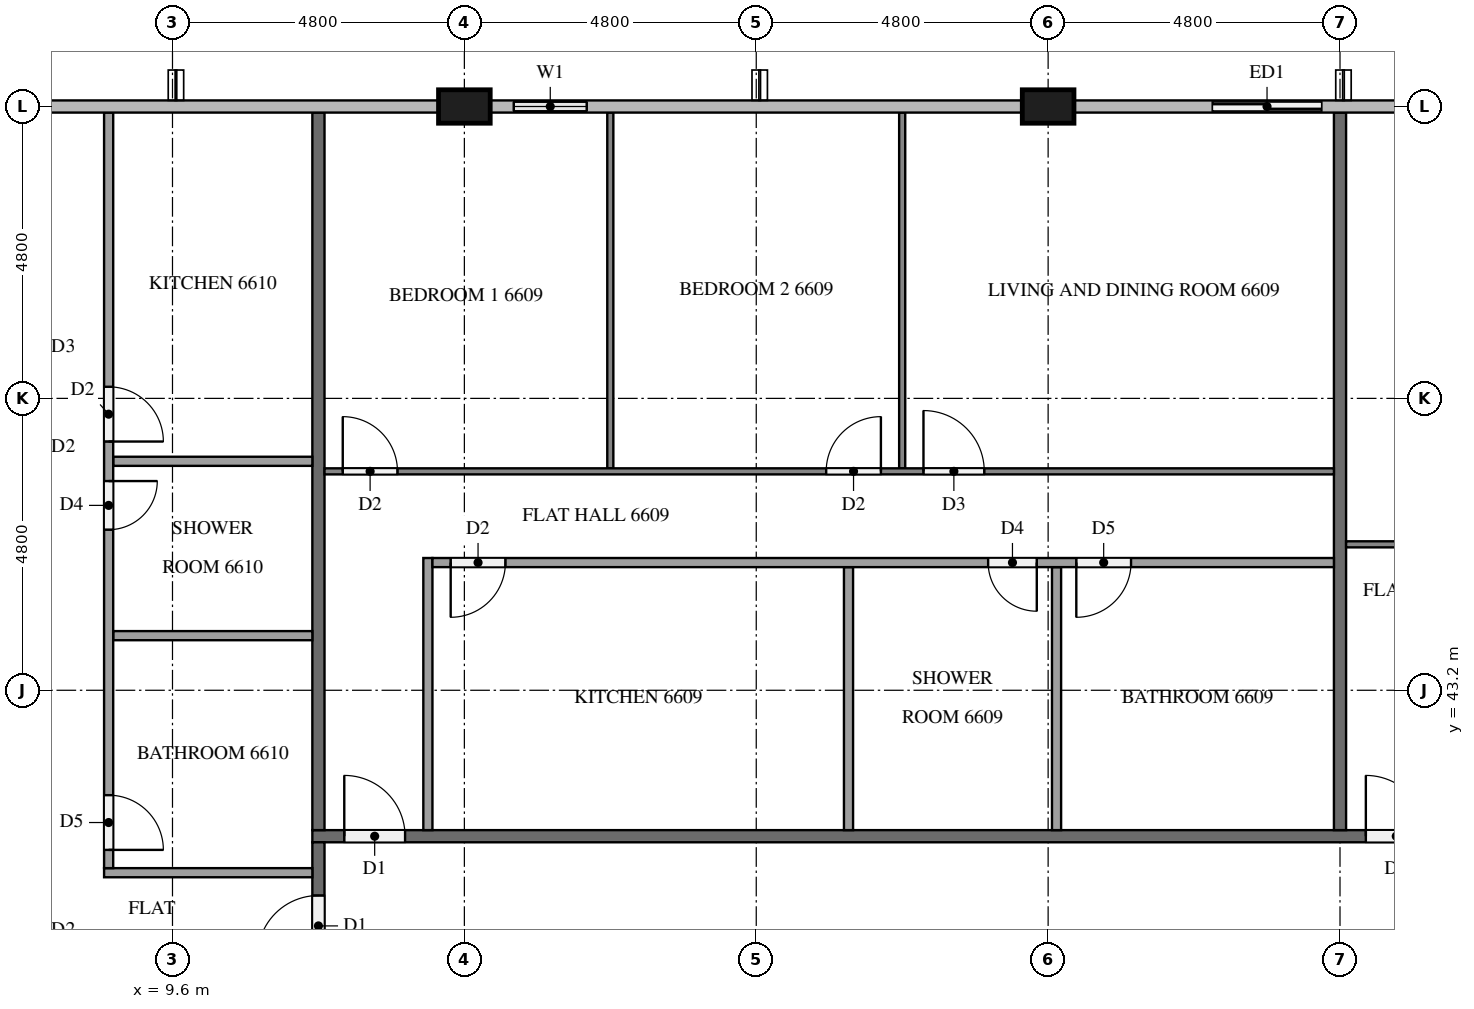
"""IFC4 building model, lengths in metres.
Left out: names, types, materials, properties, quantities, classifications, styles, units other than length and angle.
Written with IfcOpenShell. Run it as: python <this file> out.ifc"""

import sys

from ifc_helpers import new_model, si_unit, direction, frame, frame_2d, origin, origin_2d, place, context, subcontext, project, spatial, rectangle, extrude, element, fill, save


model = new_model("IFC4")
c1 = context("Model", 3, precision=1e-05, world=origin(), true_north=direction((0.0, 1.0)))
c2 = subcontext(c1, "Body", "Model", "MODEL_VIEW")
j1 = project(units=[si_unit("LENGTHUNIT", "METRE"), si_unit("PLANEANGLEUNIT", "RADIAN")], contexts=[c1])
p1 = place(None, origin())
s1 = spatial("IfcSite", under=j1, at=p1, CompositionType="ELEMENT")
p2 = place(p1, origin())
s2 = spatial("IfcBuilding", under=s1, at=p2, CompositionType="ELEMENT")
p3 = place(p2, frame((0.0, 0.0, 252.7)))
s3 = spatial("IfcBuildingStorey", under=s2, at=p3, CompositionType="ELEMENT", Elevation=252.7)
for number, where, z_axis, x_axis in (
    (1, (24.0, 52.8, 0.0), (0.0, 0.0, 1.0), (1.0, 0.0, 0.0)),
    (2, (14.4, 52.8, 0.0), (0.0, 0.0, 1.0), (1.0, 0.0, 0.0)),
):
    element("IfcColumn", number, at=place(p3, frame(where, z_axis=z_axis, x_axis=x_axis)), inside=s3, PredefinedType="COLUMN", context=c2, shape_type="SweptSolid", body=[
        extrude(rectangle(XDim=0.85, YDim=0.55, at=origin_2d()), origin(), (0.0, 0.0, 1.0), 3.2),
    ])
p4 = place(p3, frame((28.8, 52.8, 0.0), z_axis=(0.0, 0.0, 1.0), x_axis=(-1.0, 0.0, 0.0)))
e3 = element("IfcWall", 3, at=p4, inside=s3, PredefinedType="SOLIDWALL", context=c2, shape_type="SweptSolid", body=[
    extrude(rectangle(XDim=2.4, YDim=0.15, at=frame_2d((1.2, 0.0))), origin(), (0.0, 0.0, 1.0), 3.2),
])
p5 = place(p4, frame((0.3, 0.0, 0.0)))
e4 = element("IfcOpeningElement", 4, at=p5, cuts=e3, PredefinedType="OPENING", context=c2, shape_type="SweptSolid", body=[
    extrude(rectangle(XDim=1.8, YDim=2.4, at=frame_2d((0.9, 1.2))), frame((0.0, 0.085, 0.0), z_axis=(0.0, -1.0, 0.0), x_axis=(1.0, 0.0, 0.0)), (0.0, 0.0, 1.0), 0.17),
])
p6 = place(p3, frame((16.8, 52.8, 0.0), z_axis=(0.0, 0.0, 1.0), x_axis=(-1.0, 0.0, 0.0)))
e5 = element("IfcWall", 5, at=p6, inside=s3, PredefinedType="SOLIDWALL", context=c2, shape_type="SweptSolid", body=[
    extrude(rectangle(XDim=1.975, YDim=0.15, at=frame_2d((0.988, 0.0))), origin(), (0.0, 0.0, 1.0), 3.2),
])
p7 = place(p6, frame((0.387, 0.0, 0.9)))
e6 = element("IfcOpeningElement", 6, at=p7, cuts=e5, PredefinedType="OPENING", context=c2, shape_type="SweptSolid", body=[
    extrude(rectangle(XDim=1.2, YDim=1.4, at=frame_2d((0.6, 0.7))), frame((0.0, 0.085, 0.0), z_axis=(0.0, -1.0, 0.0), x_axis=(1.0, 0.0, 0.0)), (0.0, 0.0, 1.0), 0.17),
])
p8 = place(p3, frame((11.9, 40.8, 0.0), z_axis=(0.0, 0.0, 1.0), x_axis=(1.0, 0.0, 0.0)))
e7 = element("IfcWall", 7, at=p8, inside=s3, PredefinedType="PARTITIONING", context=c2, shape_type="SweptSolid", body=[
    extrude(rectangle(XDim=38.6, YDim=0.2, at=frame_2d((19.3, 0.0))), origin(), (0.0, 0.0, 1.0), 3.2),
])
p9 = place(p8, frame((31.725, 0.0, 0.0)))
e8 = element("IfcOpeningElement", 8, at=p9, cuts=e7, PredefinedType="OPENING", context=c2, shape_type="SweptSolid", body=[
    extrude(rectangle(XDim=1.0, YDim=2.1, at=frame_2d((0.5, 1.05))), frame((0.0, 0.11, 0.0), z_axis=(0.0, -1.0, 0.0), x_axis=(1.0, 0.0, 0.0)), (0.0, 0.0, 1.0), 0.22),
])
p10 = place(p8, frame((17.325, 0.0, 0.0)))
e9 = element("IfcOpeningElement", 9, at=p10, cuts=e7, PredefinedType="OPENING", context=c2, shape_type="SweptSolid", body=[
    extrude(rectangle(XDim=1.0, YDim=2.1, at=frame_2d((0.5, 1.05))), frame((0.0, 0.11, 0.0), z_axis=(0.0, -1.0, 0.0), x_axis=(1.0, 0.0, 0.0)), (0.0, 0.0, 1.0), 0.22),
])
p11 = place(p8, frame((0.525, 0.0, 0.0)))
e10 = element("IfcOpeningElement", 10, at=p11, cuts=e7, PredefinedType="OPENING", context=c2, shape_type="SweptSolid", body=[
    extrude(rectangle(XDim=1.0, YDim=2.1, at=frame_2d((0.5, 1.05))), frame((0.0, 0.11, 0.0), z_axis=(0.0, -1.0, 0.0), x_axis=(1.0, 0.0, 0.0)), (0.0, 0.0, 1.0), 0.22),
])
p12 = place(p3, frame((12.0, 12.1, 0.0), z_axis=(0.0, 0.0, 1.0), x_axis=(0.0, 1.0, 0.0)))
e11 = element("IfcWall", 11, at=p12, inside=s3, PredefinedType="PARTITIONING", context=c2, shape_type="SweptSolid", body=[
    extrude(rectangle(XDim=28.6, YDim=0.2, at=frame_2d((14.3, 0.0))), origin(), (0.0, 0.0, 1.0), 3.2),
])
p13 = place(p12, frame((26.725, 0.0, 0.0)))
e12 = element("IfcOpeningElement", 12, at=p13, cuts=e11, PredefinedType="OPENING", context=c2, shape_type="SweptSolid", body=[
    extrude(rectangle(XDim=1.0, YDim=2.1, at=frame_2d((0.5, 1.05))), frame((0.0, 0.11, 0.0), z_axis=(0.0, -1.0, 0.0), x_axis=(1.0, 0.0, 0.0)), (0.0, 0.0, 1.0), 0.22),
])
p14 = place(p12, frame((24.875, 0.0, 0.0)))
e13 = element("IfcOpeningElement", 13, at=p14, cuts=e11, PredefinedType="OPENING", context=c2, shape_type="SweptSolid", body=[
    extrude(rectangle(XDim=1.0, YDim=2.1, at=frame_2d((0.5, 1.05))), frame((0.0, 0.11, 0.0), z_axis=(0.0, -1.0, 0.0), x_axis=(1.0, 0.0, 0.0)), (0.0, 0.0, 1.0), 0.22),
])
p15 = place(p12, frame((17.675, 0.0, 0.0)))
e14 = element("IfcOpeningElement", 14, at=p15, cuts=e11, PredefinedType="OPENING", context=c2, shape_type="SweptSolid", body=[
    extrude(rectangle(XDim=1.0, YDim=2.1, at=frame_2d((0.5, 1.05))), frame((0.0, 0.11, 0.0), z_axis=(0.0, -1.0, 0.0), x_axis=(1.0, 0.0, 0.0)), (0.0, 0.0, 1.0), 0.22),
])
p16 = place(p12, frame((2.725, 0.0, 0.0)))
e15 = element("IfcOpeningElement", 15, at=p16, cuts=e11, PredefinedType="OPENING", context=c2, shape_type="SweptSolid", body=[
    extrude(rectangle(XDim=1.0, YDim=2.1, at=frame_2d((0.5, 1.05))), frame((0.0, 0.11, 0.0), z_axis=(0.0, -1.0, 0.0), x_axis=(1.0, 0.0, 0.0)), (0.0, 0.0, 1.0), 0.22),
])
p17 = place(p12, frame((0.875, 0.0, 0.0)))
e16 = element("IfcOpeningElement", 16, at=p17, cuts=e11, PredefinedType="OPENING", context=c2, shape_type="SweptSolid", body=[
    extrude(rectangle(XDim=1.0, YDim=2.1, at=frame_2d((0.5, 1.05))), frame((0.0, 0.11, 0.0), z_axis=(0.0, -1.0, 0.0), x_axis=(1.0, 0.0, 0.0)), (0.0, 0.0, 1.0), 0.22),
])
for number, where, z_axis, x_axis in (
    (17, (28.8, 52.7, 0.0), (0.0, 0.0, 1.0), (0.0, -1.0, 0.0)),
    (18, (12.0, 52.7, 0.0), (0.0, 0.0, 1.0), (0.0, -1.0, 0.0)),
):
    element("IfcWall", number, at=place(p3, frame(where, z_axis=z_axis, x_axis=x_axis)), inside=s3, PredefinedType="PARTITIONING", context=c2, shape_type="SweptSolid", body=[
        extrude(rectangle(XDim=11.8, YDim=0.2, at=frame_2d((5.9, 0.0))), origin(), (0.0, 0.0, 1.0), 3.2),
    ])
p18 = place(p3, frame((28.9, 45.6, 0.0), z_axis=(0.0, 0.0, 1.0), x_axis=(1.0, 0.0, 0.0)))
e19 = element("IfcWall", 19, at=p18, inside=s3, PredefinedType="PARTITIONING", context=c2, shape_type="SweptSolid", body=[
    extrude(rectangle(XDim=14.2, YDim=0.1, at=frame_2d((7.1, 0.0))), origin(), (0.0, 0.0, 1.0), 3.2),
])
p19 = place(p18, frame((3.35, 0.0, 0.0)))
e20 = element("IfcOpeningElement", 20, at=p19, cuts=e19, PredefinedType="OPENING", context=c2, shape_type="SweptSolid", body=[
    extrude(rectangle(XDim=1.0, YDim=2.1, at=frame_2d((0.5, 1.05))), frame((0.0, 0.06, 0.0), z_axis=(0.0, -1.0, 0.0), x_axis=(1.0, 0.0, 0.0)), (0.0, 0.0, 1.0), 0.12),
])
p20 = place(p18, frame((5.05, 0.0, 0.0)))
e21 = element("IfcOpeningElement", 21, at=p20, cuts=e19, PredefinedType="OPENING", context=c2, shape_type="SweptSolid", body=[
    extrude(rectangle(XDim=0.9, YDim=2.1, at=frame_2d((0.45, 1.05))), frame((0.0, 0.06, 0.0), z_axis=(0.0, -1.0, 0.0), x_axis=(1.0, 0.0, 0.0)), (0.0, 0.0, 1.0), 0.12),
])
p21 = place(p18, frame((13.0, 0.0, 0.0)))
e22 = element("IfcOpeningElement", 22, at=p21, cuts=e19, PredefinedType="OPENING", context=c2, shape_type="SweptSolid", body=[
    extrude(rectangle(XDim=0.9, YDim=2.1, at=frame_2d((0.45, 1.05))), frame((0.0, 0.06, 0.0), z_axis=(0.0, -1.0, 0.0), x_axis=(1.0, 0.0, 0.0)), (0.0, 0.0, 1.0), 0.12),
])
for number, where, z_axis, x_axis in (
    (23, (16.8, 46.85, 0.0), (0.0, 0.0, 1.0), (0.0, 1.0, 0.0)),
    (24, (21.6, 46.85, 0.0), (0.0, 0.0, 1.0), (0.0, 1.0, 0.0)),
):
    element("IfcWall", number, at=place(p3, frame(where, z_axis=z_axis, x_axis=x_axis)), inside=s3, PredefinedType="PARTITIONING", context=c2, shape_type="SweptSolid", body=[
        extrude(rectangle(XDim=5.85, YDim=0.1, at=frame_2d((2.925, 0.0))), origin(), (0.0, 0.0, 1.0), 3.2),
    ])
p22 = place(p3, frame((12.1, 46.8, 0.0), z_axis=(0.0, 0.0, 1.0), x_axis=(1.0, 0.0, 0.0)))
e25 = element("IfcWall", 25, at=p22, inside=s3, PredefinedType="PARTITIONING", context=c2, shape_type="SweptSolid", body=[
    extrude(rectangle(XDim=16.6, YDim=0.1, at=frame_2d((8.3, 0.0))), origin(), (0.0, 0.0, 1.0), 3.2),
])
p23 = place(p22, frame((0.3, 0.0, 0.0)))
e26 = element("IfcOpeningElement", 26, at=p23, cuts=e25, PredefinedType="OPENING", context=c2, shape_type="SweptSolid", body=[
    extrude(rectangle(XDim=0.9, YDim=2.1, at=frame_2d((0.45, 1.05))), frame((0.0, 0.06, 0.0), z_axis=(0.0, -1.0, 0.0), x_axis=(1.0, 0.0, 0.0)), (0.0, 0.0, 1.0), 0.12),
])
p24 = place(p22, frame((8.25, 0.0, 0.0)))
e27 = element("IfcOpeningElement", 27, at=p24, cuts=e25, PredefinedType="OPENING", context=c2, shape_type="SweptSolid", body=[
    extrude(rectangle(XDim=0.9, YDim=2.1, at=frame_2d((0.45, 1.05))), frame((0.0, 0.06, 0.0), z_axis=(0.0, -1.0, 0.0), x_axis=(1.0, 0.0, 0.0)), (0.0, 0.0, 1.0), 0.12),
])
p25 = place(p22, frame((9.85, 0.0, 0.0)))
e28 = element("IfcOpeningElement", 28, at=p25, cuts=e25, PredefinedType="OPENING", context=c2, shape_type="SweptSolid", body=[
    extrude(rectangle(XDim=1.0, YDim=2.1, at=frame_2d((0.5, 1.05))), frame((0.0, 0.06, 0.0), z_axis=(0.0, -1.0, 0.0), x_axis=(1.0, 0.0, 0.0)), (0.0, 0.0, 1.0), 0.12),
])
for number, where, z_axis, x_axis in (
    (29, (20.717, 40.9, 0.0), (0.0, 0.0, 1.0), (0.0, 1.0, 0.0)),
    (30, (24.138, 40.9, 0.0), (0.0, 0.0, 1.0), (0.0, 1.0, 0.0)),
):
    element("IfcWall", number, at=place(p3, frame(where, z_axis=z_axis, x_axis=x_axis)), inside=s3, PredefinedType="PARTITIONING", context=c2, shape_type="SweptSolid", body=[
        extrude(rectangle(XDim=4.325, YDim=0.15, at=frame_2d((2.163, 0.0))), origin(), (0.0, 0.0, 1.0), 3.2),
    ])
p26 = place(p3, frame((13.8, 40.9, 0.0), z_axis=(0.0, 0.0, 1.0), x_axis=(0.0, 1.0, 0.0)))
e31 = element("IfcWall", 31, at=p26, inside=s3, PredefinedType="PARTITIONING", context=c2, shape_type="SweptSolid", body=[
    extrude(rectangle(XDim=4.475, YDim=0.15, at=frame_2d((2.238, 0.0))), origin(), (0.0, 0.0, 1.0), 3.2),
])
p27 = place(p3, frame((28.7, 45.3, 0.0), z_axis=(0.0, 0.0, 1.0), x_axis=(-1.0, 0.0, 0.0)))
e32 = element("IfcWall", 32, at=p27, inside=s3, PredefinedType="PARTITIONING", context=c2, shape_type="SweptSolid", body=[
    extrude(rectangle(XDim=14.825, YDim=0.15, at=frame_2d((7.413, 0.0))), origin(), (0.0, 0.0, 1.0), 3.2),
])
p28 = place(p27, frame((13.625, 0.0, 0.0)))
e33 = element("IfcOpeningElement", 33, at=p28, cuts=e32, PredefinedType="OPENING", context=c2, shape_type="SweptSolid", body=[
    extrude(rectangle(XDim=0.9, YDim=2.1, at=frame_2d((0.45, 1.05))), frame((0.0, 0.085, 0.0), z_axis=(0.0, -1.0, 0.0), x_axis=(1.0, 0.0, 0.0)), (0.0, 0.0, 1.0), 0.17),
])
p29 = place(p27, frame((4.886, 0.0, 0.0)))
e34 = element("IfcOpeningElement", 34, at=p29, cuts=e32, PredefinedType="OPENING", context=c2, shape_type="SweptSolid", body=[
    extrude(rectangle(XDim=0.8, YDim=2.1, at=frame_2d((0.4, 1.05))), frame((0.0, 0.085, 0.0), z_axis=(0.0, -1.0, 0.0), x_axis=(1.0, 0.0, 0.0)), (0.0, 0.0, 1.0), 0.17),
])
p30 = place(p27, frame((3.336, 0.0, 0.0)))
e35 = element("IfcOpeningElement", 35, at=p30, cuts=e32, PredefinedType="OPENING", context=c2, shape_type="SweptSolid", body=[
    extrude(rectangle(XDim=0.9, YDim=2.1, at=frame_2d((0.45, 1.05))), frame((0.0, 0.085, 0.0), z_axis=(0.0, -1.0, 0.0), x_axis=(1.0, 0.0, 0.0)), (0.0, 0.0, 1.0), 0.17),
])
for number, where, z_axis, x_axis in (
    (36, (11.9, 44.098, 0.0), (0.0, 0.0, 1.0), (-1.0, 0.0, 0.0)),
    (37, (11.9, 46.965, 0.0), (0.0, 0.0, 1.0), (-1.0, 0.0, 0.0)),
):
    element("IfcWall", number, at=place(p3, frame(where, z_axis=z_axis, x_axis=x_axis)), inside=s3, PredefinedType="PARTITIONING", context=c2, shape_type="SweptSolid", body=[
        extrude(rectangle(XDim=3.275, YDim=0.15, at=frame_2d((1.637, 0.0))), origin(), (0.0, 0.0, 1.0), 3.2),
    ])
p31 = place(p3, frame((11.9, 40.2, 0.0), z_axis=(0.0, 0.0, 1.0), x_axis=(-1.0, 0.0, 0.0)))
e38 = element("IfcWall", 38, at=p31, inside=s3, PredefinedType="PARTITIONING", context=c2, shape_type="SweptSolid", body=[
    extrude(rectangle(XDim=3.425, YDim=0.15, at=frame_2d((1.712, 0.0))), origin(), (0.0, 0.0, 1.0), 3.2),
])
p32 = place(p3, frame((8.55, 52.7, 0.0), z_axis=(0.0, 0.0, 1.0), x_axis=(0.0, -1.0, 0.0)))
e39 = element("IfcWall", 39, at=p32, inside=s3, PredefinedType="PARTITIONING", context=c2, shape_type="SweptSolid", body=[
    extrude(rectangle(XDim=12.425, YDim=0.15, at=frame_2d((6.212, 0.0))), origin(), (0.0, 0.0, 1.0), 3.2),
])
p33 = place(p32, frame((11.225, 0.0, 0.0)))
e40 = element("IfcOpeningElement", 40, at=p33, cuts=e39, PredefinedType="OPENING", context=c2, shape_type="SweptSolid", body=[
    extrude(rectangle(XDim=0.9, YDim=2.1, at=frame_2d((0.45, 1.05))), frame((0.0, 0.085, 0.0), z_axis=(0.0, -1.0, 0.0), x_axis=(1.0, 0.0, 0.0)), (0.0, 0.0, 1.0), 0.17),
])
p34 = place(p32, frame((6.06, 0.0, 0.0)))
e41 = element("IfcOpeningElement", 41, at=p34, cuts=e39, PredefinedType="OPENING", context=c2, shape_type="SweptSolid", body=[
    extrude(rectangle(XDim=0.8, YDim=2.1, at=frame_2d((0.4, 1.05))), frame((0.0, 0.085, 0.0), z_axis=(0.0, -1.0, 0.0), x_axis=(1.0, 0.0, 0.0)), (0.0, 0.0, 1.0), 0.17),
])
p35 = place(p32, frame((4.51, 0.0, 0.0)))
e42 = element("IfcOpeningElement", 42, at=p35, cuts=e39, PredefinedType="OPENING", context=c2, shape_type="SweptSolid", body=[
    extrude(rectangle(XDim=0.9, YDim=2.1, at=frame_2d((0.45, 1.05))), frame((0.0, 0.085, 0.0), z_axis=(0.0, -1.0, 0.0), x_axis=(1.0, 0.0, 0.0)), (0.0, 0.0, 1.0), 0.17),
])
p36 = place(p5, origin())
e43 = element("IfcDoor", 43, at=p36, inside=s3, OperationType="SLIDING_TO_LEFT", PredefinedType="DOOR", context=c2, shape_type="SweptSolid", body=[
    extrude(rectangle(XDim=1.8, YDim=2.4, at=frame_2d((0.9, 1.2))), frame((0.0, 0.025, 0.0), z_axis=(0.0, -1.0, 0.0), x_axis=(1.0, 0.0, 0.0)), (0.0, 0.0, 1.0), 0.05),
])
fill(e4, e43)
p37 = place(p7, origin())
e44 = element("IfcWindow", 44, at=p37, inside=s3, PartitioningType="SINGLE_PANEL", PredefinedType="WINDOW", context=c2, shape_type="SweptSolid", body=[
    extrude(rectangle(XDim=1.2, YDim=1.4, at=frame_2d((0.6, 0.7))), frame((0.0, 0.03, 0.0), z_axis=(0.0, -1.0, 0.0), x_axis=(1.0, 0.0, 0.0)), (0.0, 0.0, 1.0), 0.06),
])
fill(e6, e44)
p38 = place(p10, origin())
e45 = element("IfcDoor", 45, at=p38, inside=s3, OperationType="SINGLE_SWING_LEFT", PredefinedType="DOOR", context=c2, shape_type="SweptSolid", body=[
    extrude(rectangle(XDim=1.0, YDim=2.1, at=frame_2d((0.5, 1.05))), frame((0.0, 0.025, 0.0), z_axis=(0.0, -1.0, 0.0), x_axis=(1.0, 0.0, 0.0)), (0.0, 0.0, 1.0), 0.05),
])
fill(e9, e45)
p39 = place(p11, origin())
e46 = element("IfcDoor", 46, at=p39, inside=s3, OperationType="SINGLE_SWING_LEFT", PredefinedType="DOOR", context=c2, shape_type="SweptSolid", body=[
    extrude(rectangle(XDim=1.0, YDim=2.1, at=frame_2d((0.5, 1.05))), frame((0.0, 0.025, 0.0), z_axis=(0.0, -1.0, 0.0), x_axis=(1.0, 0.0, 0.0)), (0.0, 0.0, 1.0), 0.05),
])
fill(e10, e46)
p40 = place(p13, origin())
e47 = element("IfcDoor", 47, at=p40, inside=s3, OperationType="SINGLE_SWING_LEFT", PredefinedType="DOOR", context=c2, shape_type="SweptSolid", body=[
    extrude(rectangle(XDim=1.0, YDim=2.1, at=frame_2d((0.5, 1.05))), frame((0.0, 0.025, 0.0), z_axis=(0.0, -1.0, 0.0), x_axis=(1.0, 0.0, 0.0)), (0.0, 0.0, 1.0), 0.05),
])
fill(e12, e47)
p41 = place(p23, origin())
e48 = element("IfcDoor", 48, at=p41, inside=s3, OperationType="SINGLE_SWING_LEFT", PredefinedType="DOOR", context=c2, shape_type="SweptSolid", body=[
    extrude(rectangle(XDim=0.9, YDim=2.1, at=frame_2d((0.45, 1.05))), frame((0.0, 0.025, 0.0), z_axis=(0.0, -1.0, 0.0), x_axis=(1.0, 0.0, 0.0)), (0.0, 0.0, 1.0), 0.05),
])
fill(e26, e48)
p42 = place(p24, origin())
e49 = element("IfcDoor", 49, at=p42, inside=s3, OperationType="SINGLE_SWING_RIGHT", PredefinedType="DOOR", context=c2, shape_type="SweptSolid", body=[
    extrude(rectangle(XDim=0.9, YDim=2.1, at=frame_2d((0.45, 1.05))), frame((0.0, 0.025, 0.0), z_axis=(0.0, -1.0, 0.0), x_axis=(1.0, 0.0, 0.0)), (0.0, 0.0, 1.0), 0.05),
])
fill(e27, e49)
p43 = place(p25, origin())
e50 = element("IfcDoor", 50, at=p43, inside=s3, OperationType="SINGLE_SWING_LEFT", PredefinedType="DOOR", context=c2, shape_type="SweptSolid", body=[
    extrude(rectangle(XDim=1.0, YDim=2.1, at=frame_2d((0.5, 1.05))), frame((0.0, 0.025, 0.0), z_axis=(0.0, -1.0, 0.0), x_axis=(1.0, 0.0, 0.0)), (0.0, 0.0, 1.0), 0.05),
])
fill(e28, e50)
p44 = place(p28, origin())
e51 = element("IfcDoor", 51, at=p44, inside=s3, OperationType="SINGLE_SWING_RIGHT", PredefinedType="DOOR", context=c2, shape_type="SweptSolid", body=[
    extrude(rectangle(XDim=0.9, YDim=2.1, at=frame_2d((0.45, 1.05))), frame((0.0, 0.025, 0.0), z_axis=(0.0, -1.0, 0.0), x_axis=(1.0, 0.0, 0.0)), (0.0, 0.0, 1.0), 0.05),
])
fill(e33, e51)
p45 = place(p29, origin())
e52 = element("IfcDoor", 52, at=p45, inside=s3, OperationType="SINGLE_SWING_LEFT", PredefinedType="DOOR", context=c2, shape_type="SweptSolid", body=[
    extrude(rectangle(XDim=0.8, YDim=2.1, at=frame_2d((0.4, 1.05))), frame((0.0, 0.025, 0.0), z_axis=(0.0, -1.0, 0.0), x_axis=(1.0, 0.0, 0.0)), (0.0, 0.0, 1.0), 0.05),
])
fill(e34, e52)
p46 = place(p30, origin())
e53 = element("IfcDoor", 53, at=p46, inside=s3, OperationType="SINGLE_SWING_RIGHT", PredefinedType="DOOR", context=c2, shape_type="SweptSolid", body=[
    extrude(rectangle(XDim=0.9, YDim=2.1, at=frame_2d((0.45, 1.05))), frame((0.0, 0.025, 0.0), z_axis=(0.0, -1.0, 0.0), x_axis=(1.0, 0.0, 0.0)), (0.0, 0.0, 1.0), 0.05),
])
fill(e35, e53)
p47 = place(p33, origin())
e54 = element("IfcDoor", 54, at=p47, inside=s3, OperationType="SINGLE_SWING_RIGHT", PredefinedType="DOOR", context=c2, shape_type="SweptSolid", body=[
    extrude(rectangle(XDim=0.9, YDim=2.1, at=frame_2d((0.45, 1.05))), frame((0.0, 0.025, 0.0), z_axis=(0.0, -1.0, 0.0), x_axis=(1.0, 0.0, 0.0)), (0.0, 0.0, 1.0), 0.05),
])
fill(e40, e54)
p48 = place(p34, origin())
e55 = element("IfcDoor", 55, at=p48, inside=s3, OperationType="SINGLE_SWING_LEFT", PredefinedType="DOOR", context=c2, shape_type="SweptSolid", body=[
    extrude(rectangle(XDim=0.8, YDim=2.1, at=frame_2d((0.4, 1.05))), frame((0.0, 0.025, 0.0), z_axis=(0.0, -1.0, 0.0), x_axis=(1.0, 0.0, 0.0)), (0.0, 0.0, 1.0), 0.05),
])
fill(e41, e55)
p49 = place(p35, origin())
e56 = element("IfcDoor", 56, at=p49, inside=s3, OperationType="SINGLE_SWING_RIGHT", PredefinedType="DOOR", context=c2, shape_type="SweptSolid", body=[
    extrude(rectangle(XDim=0.9, YDim=2.1, at=frame_2d((0.45, 1.05))), frame((0.0, 0.025, 0.0), z_axis=(0.0, -1.0, 0.0), x_axis=(1.0, 0.0, 0.0)), (0.0, 0.0, 1.0), 0.05),
])
fill(e42, e56)
save(model, sys.argv[1])
